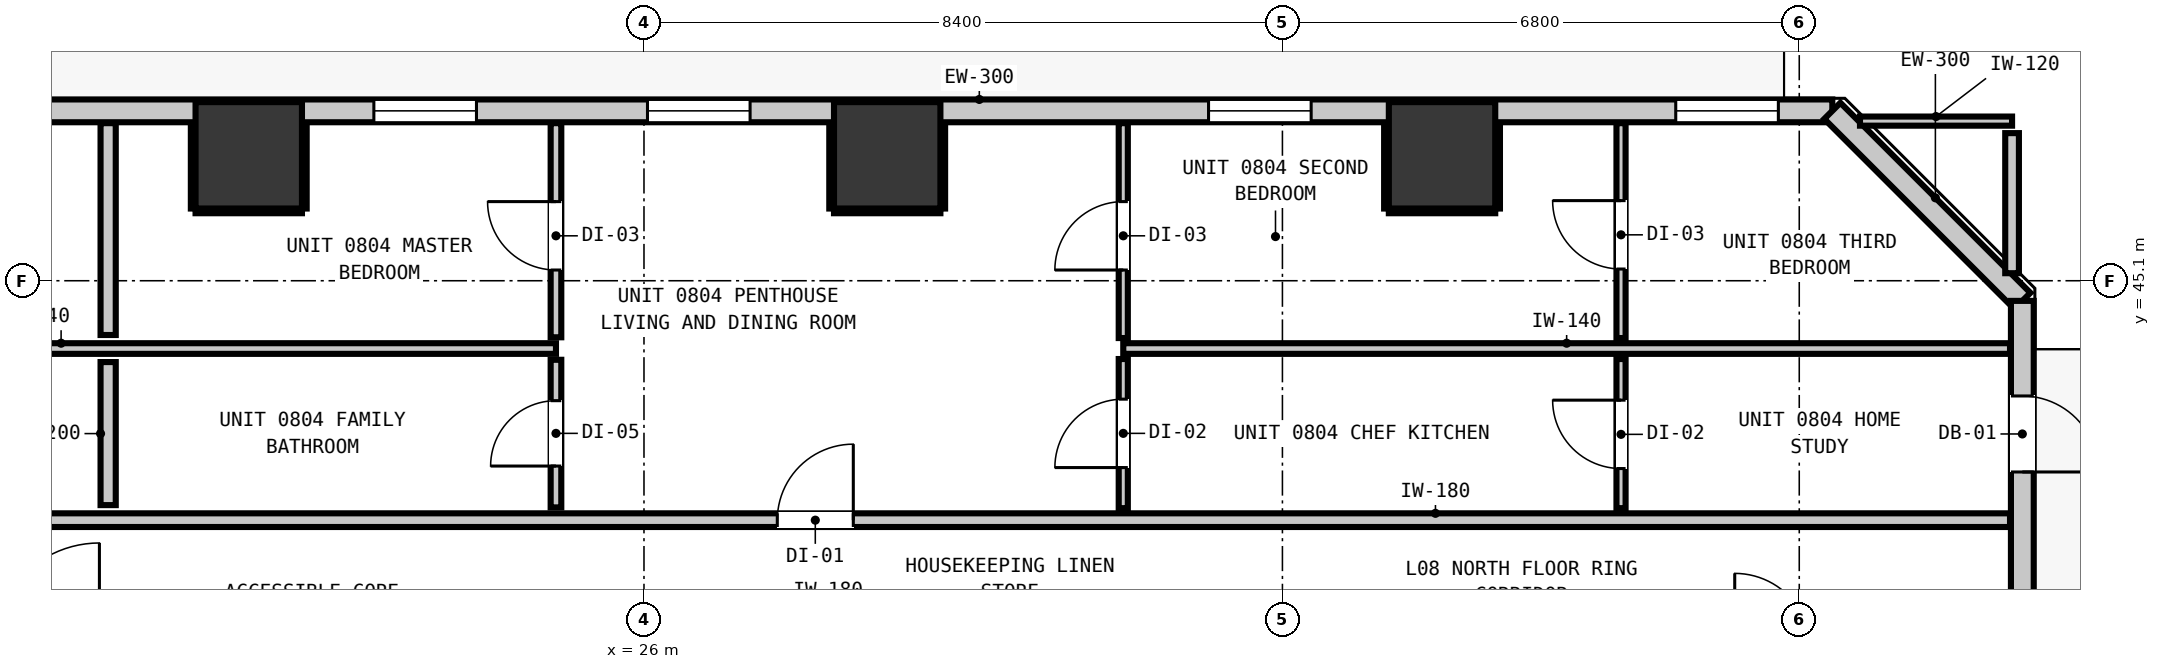
"""IFC4 building model, lengths in metres.
Left out: names, types, materials, properties, quantities, classifications, styles, units other than length and angle.
Written with IfcOpenShell. Run it as: python <this file> out.ifc"""

import sys

from ifc_helpers import new_model, si_unit, direction, frame, frame_2d, origin, origin_2d, place, context, subcontext, project, spatial, rectangle, extrude, element, fill, save


model = new_model("IFC4")
c1 = context("Model", 3, precision=1e-05, world=origin(), true_north=direction((0.0, 1.0)))
c2 = subcontext(c1, "Body", "Model", "MODEL_VIEW")
j1 = project(units=[si_unit("LENGTHUNIT", "METRE"), si_unit("PLANEANGLEUNIT", "RADIAN")], contexts=[c1])
p1 = place(None, origin())
s1 = spatial("IfcSite", under=j1, at=p1, CompositionType="ELEMENT")
p2 = place(p1, origin())
s2 = spatial("IfcBuilding", under=s1, at=p2, CompositionType="ELEMENT")
p3 = place(p2, frame((0.0, 0.0, 31.96)))
s3 = spatial("IfcBuildingStorey", under=s2, at=p3, CompositionType="ELEMENT", Elevation=31.96)
for number, where, z_axis, x_axis in (
    (1, (20.8, 46.75, 0.0), (0.0, 0.0, 1.0), (1.0, 0.0, 0.0)),
    (2, (29.2, 46.75, 0.0), (0.0, 0.0, 1.0), (1.0, 0.0, 0.0)),
    (3, (36.5, 46.75, 0.0), (0.0, 0.0, 1.0), (1.0, 0.0, 0.0)),
):
    element("IfcColumn", number, at=place(p3, frame(where, z_axis=z_axis, x_axis=x_axis)), inside=s3, PredefinedType="COLUMN", context=c2, shape_type="SweptSolid", body=[
        extrude(rectangle(XDim=1.4, YDim=1.4, at=origin_2d()), origin(), (0.0, 0.0, 1.0), 3.32),
    ])
p4 = place(p3, frame((4.165, 47.335, 0.0), z_axis=(0.0, 0.0, 1.0), x_axis=(1.0, 0.0, 0.0)))
e4 = element("IfcWall", 4, at=p4, inside=s3, PredefinedType="STANDARD", context=c2, shape_type="SweptSolid", body=[
    extrude(rectangle(XDim=37.47, YDim=0.3, at=frame_2d((18.735, 0.0))), origin(), (0.0, 0.0, 1.0), 3.06),
])
p5 = place(p4, frame((0.901, 0.0, 0.0)))
e5 = element("IfcOpeningElement", 5, at=p5, cuts=e4, PredefinedType="OPENING", context=c2, shape_type="SweptSolid", body=[
    extrude(rectangle(XDim=1.0, YDim=2.15, at=frame_2d((0.5, 1.075))), frame((0.0, 0.16, 0.0), z_axis=(0.0, -1.0, 0.0), x_axis=(1.0, 0.0, 0.0)), (0.0, 0.0, 1.0), 0.32),
])
p6 = place(p4, frame((4.568, 0.0, 0.85)))
e6 = element("IfcOpeningElement", 6, at=p6, cuts=e4, PredefinedType="OPENING", context=c2, shape_type="SweptSolid", body=[
    extrude(rectangle(XDim=1.35, YDim=1.85, at=frame_2d((0.675, 0.925))), frame((0.0, 0.16, 0.0), z_axis=(0.0, -1.0, 0.0), x_axis=(1.0, 0.0, 0.0)), (0.0, 0.0, 1.0), 0.32),
])
p7 = place(p4, frame((11.72, 0.0, 0.85)))
e7 = element("IfcOpeningElement", 7, at=p7, cuts=e4, PredefinedType="OPENING", context=c2, shape_type="SweptSolid", body=[
    extrude(rectangle(XDim=1.35, YDim=1.85, at=frame_2d((0.675, 0.925))), frame((0.0, 0.16, 0.0), z_axis=(0.0, -1.0, 0.0), x_axis=(1.0, 0.0, 0.0)), (0.0, 0.0, 1.0), 0.32),
])
p8 = place(p4, frame((21.881, 0.0, 0.85)))
e8 = element("IfcOpeningElement", 8, at=p8, cuts=e4, PredefinedType="OPENING", context=c2, shape_type="SweptSolid", body=[
    extrude(rectangle(XDim=1.35, YDim=1.85, at=frame_2d((0.675, 0.925))), frame((0.0, 0.16, 0.0), z_axis=(0.0, -1.0, 0.0), x_axis=(1.0, 0.0, 0.0)), (0.0, 0.0, 1.0), 0.32),
])
p9 = place(p4, frame((18.281, 0.0, 0.85)))
e9 = element("IfcOpeningElement", 9, at=p9, cuts=e4, PredefinedType="OPENING", context=c2, shape_type="SweptSolid", body=[
    extrude(rectangle(XDim=1.35, YDim=1.85, at=frame_2d((0.675, 0.925))), frame((0.0, 0.16, 0.0), z_axis=(0.0, -1.0, 0.0), x_axis=(1.0, 0.0, 0.0)), (0.0, 0.0, 1.0), 0.32),
])
p10 = place(p4, frame((29.263, 0.0, 0.85)))
e10 = element("IfcOpeningElement", 10, at=p10, cuts=e4, PredefinedType="OPENING", context=c2, shape_type="SweptSolid", body=[
    extrude(rectangle(XDim=1.35, YDim=1.85, at=frame_2d((0.675, 0.925))), frame((0.0, 0.16, 0.0), z_axis=(0.0, -1.0, 0.0), x_axis=(1.0, 0.0, 0.0)), (0.0, 0.0, 1.0), 0.32),
])
p11 = place(p4, frame((35.41, 0.0, 0.85)))
e11 = element("IfcOpeningElement", 11, at=p11, cuts=e4, PredefinedType="OPENING", context=c2, shape_type="SweptSolid", body=[
    extrude(rectangle(XDim=1.35, YDim=1.85, at=frame_2d((0.675, 0.925))), frame((0.0, 0.16, 0.0), z_axis=(0.0, -1.0, 0.0), x_axis=(1.0, 0.0, 0.0)), (0.0, 0.0, 1.0), 0.32),
])
p12 = place(p3, frame((41.635, 47.335, 0.0), z_axis=(0.0, 0.0, 1.0), x_axis=(0.707106781187, -0.707106781187, 0.0)))
e12 = element("IfcWall", 12, at=p12, inside=s3, PredefinedType="STANDARD", context=c2, shape_type="SweptSolid", body=[
    extrude(rectangle(XDim=3.536, YDim=0.3, at=frame_2d((1.768, 0.0))), origin(), (0.0, 0.0, 1.0), 3.06),
])
p13 = place(p3, frame((44.135, 44.835, 0.0), z_axis=(0.0, 0.0, 1.0), x_axis=(0.0, -1.0, 0.0)))
e13 = element("IfcWall", 13, at=p13, inside=s3, PredefinedType="STANDARD", context=c2, shape_type="SweptSolid", body=[
    extrude(rectangle(XDim=34.67, YDim=0.3, at=frame_2d((17.335, 0.0))), origin(), (0.0, 0.0, 1.0), 3.06),
])
p14 = place(p13, frame((1.251, 0.0, 0.0)))
e14 = element("IfcOpeningElement", 14, at=p14, cuts=e13, PredefinedType="OPENING", context=c2, shape_type="SweptSolid", body=[
    extrude(rectangle(XDim=1.0, YDim=2.15, at=frame_2d((0.5, 1.075))), frame((0.0, 0.16, 0.0), z_axis=(0.0, -1.0, 0.0), x_axis=(1.0, 0.0, 0.0)), (0.0, 0.0, 1.0), 0.32),
])
p15 = place(p13, frame((32.583, 0.0, 0.85)))
e15 = element("IfcOpeningElement", 15, at=p15, cuts=e13, PredefinedType="OPENING", context=c2, shape_type="SweptSolid", body=[
    extrude(rectangle(XDim=1.35, YDim=1.85, at=frame_2d((0.675, 0.925))), frame((0.0, 0.16, 0.0), z_axis=(0.0, -1.0, 0.0), x_axis=(1.0, 0.0, 0.0)), (0.0, 0.0, 1.0), 0.32),
])
p16 = place(p13, frame((17.81, 0.0, 0.85)))
e16 = element("IfcOpeningElement", 16, at=p16, cuts=e13, PredefinedType="OPENING", context=c2, shape_type="SweptSolid", body=[
    extrude(rectangle(XDim=1.35, YDim=1.85, at=frame_2d((0.675, 0.925))), frame((0.0, 0.16, 0.0), z_axis=(0.0, -1.0, 0.0), x_axis=(1.0, 0.0, 0.0)), (0.0, 0.0, 1.0), 0.32),
])
p17 = place(p13, frame((6.834, 0.0, 0.85)))
e17 = element("IfcOpeningElement", 17, at=p17, cuts=e13, PredefinedType="OPENING", context=c2, shape_type="SweptSolid", body=[
    extrude(rectangle(XDim=1.35, YDim=1.85, at=frame_2d((0.675, 0.925))), frame((0.0, 0.16, 0.0), z_axis=(0.0, -1.0, 0.0), x_axis=(1.0, 0.0, 0.0)), (0.0, 0.0, 1.0), 0.32),
])
p18 = place(p3, frame((12.989, 41.95, 0.0), z_axis=(0.0, 0.0, 1.0), x_axis=(1.0, 0.0, 0.0)))
e18 = element("IfcWall", 18, at=p18, inside=s3, PredefinedType="PARTITIONING", context=c2, shape_type="SweptSolid", body=[
    extrude(rectangle(XDim=30.984, YDim=0.18, at=frame_2d((15.492, 0.0))), origin(), (0.0, 0.0, 1.0), 3.06),
])
p19 = place(p18, frame((14.765, 0.0, 0.0)))
e19 = element("IfcOpeningElement", 19, at=p19, cuts=e18, PredefinedType="OPENING", context=c2, shape_type="SweptSolid", body=[
    extrude(rectangle(XDim=1.0, YDim=2.15, at=frame_2d((0.5, 1.075))), frame((0.0, 0.1, 0.0), z_axis=(0.0, -1.0, 0.0), x_axis=(1.0, 0.0, 0.0)), (0.0, 0.0, 1.0), 0.2),
])
p20 = place(p3, frame((11.82, 44.208, 0.0), z_axis=(0.0, 0.0, 1.0), x_axis=(1.0, 0.0, 0.0)))
e20 = element("IfcWall", 20, at=p20, inside=s3, PredefinedType="PARTITIONING", context=c2, shape_type="SweptSolid", body=[
    extrude(rectangle(XDim=13.022, YDim=0.14, at=frame_2d((6.511, 0.0))), origin(), (0.0, 0.0, 1.0), 3.06),
])
p21 = place(p3, frame((32.306, 44.208, 0.0), z_axis=(0.0, 0.0, 1.0), x_axis=(1.0, 0.0, 0.0)))
e21 = element("IfcWall", 21, at=p21, inside=s3, PredefinedType="PARTITIONING", context=c2, shape_type="SweptSolid", body=[
    extrude(rectangle(XDim=11.667, YDim=0.14, at=frame_2d((5.833, 0.0))), origin(), (0.0, 0.0, 1.0), 3.06),
])
p22 = place(p3, frame((41.999, 47.2, 0.0), z_axis=(0.0, 0.0, 1.0), x_axis=(1.0, 0.0, 0.0)))
e22 = element("IfcWall", 22, at=p22, inside=s3, PredefinedType="PARTITIONING", context=c2, shape_type="SweptSolid", body=[
    extrude(rectangle(XDim=2.001, YDim=0.12, at=frame_2d((1.0, 0.0))), origin(), (0.0, 0.0, 1.0), 3.06),
])
p23 = place(p3, frame((18.95, 42.148, 0.0), z_axis=(0.0, 0.0, 1.0), x_axis=(0.0, 1.0, 0.0)))
e23 = element("IfcWall", 23, at=p23, inside=s3, PredefinedType="PARTITIONING", context=c2, shape_type="SweptSolid", body=[
    extrude(rectangle(XDim=1.882, YDim=0.2, at=frame_2d((0.941, 0.0))), origin(), (0.0, 0.0, 1.0), 3.06),
])
p24 = place(p3, frame((18.95, 44.386, 0.0), z_axis=(0.0, 0.0, 1.0), x_axis=(0.0, 1.0, 0.0)))
e24 = element("IfcWall", 24, at=p24, inside=s3, PredefinedType="PARTITIONING", context=c2, shape_type="SweptSolid", body=[
    extrude(rectangle(XDim=2.787, YDim=0.2, at=frame_2d((1.394, 0.0))), origin(), (0.0, 0.0, 1.0), 3.06),
])
p25 = place(p3, frame((44.0, 45.199, 0.0), z_axis=(0.0, 0.0, 1.0), x_axis=(0.0, 1.0, 0.0)))
e25 = element("IfcWall", 25, at=p25, inside=s3, PredefinedType="PARTITIONING", context=c2, shape_type="SweptSolid", body=[
    extrude(rectangle(XDim=1.843, YDim=0.18, at=frame_2d((0.921, 0.0))), origin(), (0.0, 0.0, 1.0), 3.06),
])
p26 = place(p3, frame((24.842, 42.118, 0.0), z_axis=(0.0, 0.0, 1.0), x_axis=(0.0, 1.0, 0.0)))
e26 = element("IfcWall", 26, at=p26, inside=s3, PredefinedType="PARTITIONING", context=c2, shape_type="SweptSolid", body=[
    extrude(rectangle(XDim=1.942, YDim=0.14, at=frame_2d((0.971, 0.0))), origin(), (0.0, 0.0, 1.0), 3.06),
])
p27 = place(p26, frame((0.544, 0.0, 0.0)))
e27 = element("IfcOpeningElement", 27, at=p27, cuts=e26, PredefinedType="OPENING", context=c2, shape_type="SweptSolid", body=[
    extrude(rectangle(XDim=0.86, YDim=2.02, at=frame_2d((0.43, 1.01))), frame((0.0, 0.08, 0.0), z_axis=(0.0, -1.0, 0.0), x_axis=(1.0, 0.0, 0.0)), (0.0, 0.0, 1.0), 0.16),
])
p28 = place(p3, frame((24.842, 44.356, 0.0), z_axis=(0.0, 0.0, 1.0), x_axis=(0.0, 1.0, 0.0)))
e28 = element("IfcWall", 28, at=p28, inside=s3, PredefinedType="PARTITIONING", context=c2, shape_type="SweptSolid", body=[
    extrude(rectangle(XDim=2.817, YDim=0.14, at=frame_2d((1.409, 0.0))), origin(), (0.0, 0.0, 1.0), 3.06),
])
p29 = place(p28, frame((0.885, 0.0, 0.0)))
e29 = element("IfcOpeningElement", 29, at=p29, cuts=e28, PredefinedType="OPENING", context=c2, shape_type="SweptSolid", body=[
    extrude(rectangle(XDim=0.9, YDim=2.1, at=frame_2d((0.45, 1.05))), frame((0.0, 0.08, 0.0), z_axis=(0.0, -1.0, 0.0), x_axis=(1.0, 0.0, 0.0)), (0.0, 0.0, 1.0), 0.16),
])
p30 = place(p3, frame((32.306, 42.108, 0.0), z_axis=(0.0, 0.0, 1.0), x_axis=(0.0, 1.0, 0.0)))
e30 = element("IfcWall", 30, at=p30, inside=s3, PredefinedType="PARTITIONING", context=c2, shape_type="SweptSolid", body=[
    extrude(rectangle(XDim=1.962, YDim=0.12, at=frame_2d((0.981, 0.0))), origin(), (0.0, 0.0, 1.0), 3.06),
])
p31 = place(p30, frame((0.534, 0.0, 0.0)))
e31 = element("IfcOpeningElement", 31, at=p31, cuts=e30, PredefinedType="OPENING", context=c2, shape_type="SweptSolid", body=[
    extrude(rectangle(XDim=0.9, YDim=2.1, at=frame_2d((0.45, 1.05))), frame((0.0, 0.07, 0.0), z_axis=(0.0, -1.0, 0.0), x_axis=(1.0, 0.0, 0.0)), (0.0, 0.0, 1.0), 0.14),
])
p32 = place(p3, frame((32.306, 44.346, 0.0), z_axis=(0.0, 0.0, 1.0), x_axis=(0.0, 1.0, 0.0)))
e32 = element("IfcWall", 32, at=p32, inside=s3, PredefinedType="PARTITIONING", context=c2, shape_type="SweptSolid", body=[
    extrude(rectangle(XDim=2.827, YDim=0.12, at=frame_2d((1.414, 0.0))), origin(), (0.0, 0.0, 1.0), 3.06),
])
p33 = place(p32, frame((0.895, 0.0, 0.0)))
e33 = element("IfcOpeningElement", 33, at=p33, cuts=e32, PredefinedType="OPENING", context=c2, shape_type="SweptSolid", body=[
    extrude(rectangle(XDim=0.9, YDim=2.1, at=frame_2d((0.45, 1.05))), frame((0.0, 0.07, 0.0), z_axis=(0.0, -1.0, 0.0), x_axis=(1.0, 0.0, 0.0)), (0.0, 0.0, 1.0), 0.14),
])
p34 = place(p3, frame((38.855, 42.108, 0.0), z_axis=(0.0, 0.0, 1.0), x_axis=(0.0, 1.0, 0.0)))
e34 = element("IfcWall", 34, at=p34, inside=s3, PredefinedType="PARTITIONING", context=c2, shape_type="SweptSolid", body=[
    extrude(rectangle(XDim=1.962, YDim=0.12, at=frame_2d((0.981, 0.0))), origin(), (0.0, 0.0, 1.0), 3.06),
])
p35 = place(p34, frame((0.521, 0.0, 0.0)))
e35 = element("IfcOpeningElement", 35, at=p35, cuts=e34, PredefinedType="OPENING", context=c2, shape_type="SweptSolid", body=[
    extrude(rectangle(XDim=0.9, YDim=2.1, at=frame_2d((0.45, 1.05))), frame((0.0, 0.07, 0.0), z_axis=(0.0, -1.0, 0.0), x_axis=(1.0, 0.0, 0.0)), (0.0, 0.0, 1.0), 0.14),
])
p36 = place(p3, frame((38.855, 44.346, 0.0), z_axis=(0.0, 0.0, 1.0), x_axis=(0.0, 1.0, 0.0)))
e36 = element("IfcWall", 36, at=p36, inside=s3, PredefinedType="PARTITIONING", context=c2, shape_type="SweptSolid", body=[
    extrude(rectangle(XDim=2.827, YDim=0.12, at=frame_2d((1.414, 0.0))), origin(), (0.0, 0.0, 1.0), 3.06),
])
p37 = place(p36, frame((0.908, 0.0, 0.0)))
e37 = element("IfcOpeningElement", 37, at=p37, cuts=e36, PredefinedType="OPENING", context=c2, shape_type="SweptSolid", body=[
    extrude(rectangle(XDim=0.9, YDim=2.1, at=frame_2d((0.45, 1.05))), frame((0.0, 0.07, 0.0), z_axis=(0.0, -1.0, 0.0), x_axis=(1.0, 0.0, 0.0)), (0.0, 0.0, 1.0), 0.14),
])
p38 = place(p3, frame((20.1, 46.018, 0.0), z_axis=(0.0, 0.0, 1.0), x_axis=(1.0, 0.0, 0.0)))
e38 = element("IfcWall", 38, at=p38, inside=s3, PredefinedType="PARTITIONING", context=c2, shape_type="SweptSolid", body=[
    extrude(rectangle(XDim=1.4, YDim=0.06, at=frame_2d((0.7, 0.0))), origin(), (0.0, 0.0, 1.0), 1.45),
])
for number, where, z_axis, x_axis in (
    (39, (20.068, 46.05, 0.0), (0.0, 0.0, 1.0), (0.0, 1.0, 0.0)),
    (40, (21.532, 46.05, 0.0), (0.0, 0.0, 1.0), (0.0, 1.0, 0.0)),
):
    element("IfcWall", number, at=place(p3, frame(where, z_axis=z_axis, x_axis=x_axis)), inside=s3, PredefinedType="PARTITIONING", context=c2, shape_type="SweptSolid", body=[
        extrude(rectangle(XDim=1.12, YDim=0.06, at=frame_2d((0.56, 0.0))), origin(), (0.0, 0.0, 1.0), 1.45),
    ])
p39 = place(p3, frame((28.5, 46.018, 0.0), z_axis=(0.0, 0.0, 1.0), x_axis=(1.0, 0.0, 0.0)))
e41 = element("IfcWall", 41, at=p39, inside=s3, PredefinedType="PARTITIONING", context=c2, shape_type="SweptSolid", body=[
    extrude(rectangle(XDim=1.4, YDim=0.06, at=frame_2d((0.7, 0.0))), origin(), (0.0, 0.0, 1.0), 1.45),
])
for number, where, z_axis, x_axis in (
    (42, (28.468, 46.05, 0.0), (0.0, 0.0, 1.0), (0.0, 1.0, 0.0)),
    (43, (29.932, 46.05, 0.0), (0.0, 0.0, 1.0), (0.0, 1.0, 0.0)),
):
    element("IfcWall", number, at=place(p3, frame(where, z_axis=z_axis, x_axis=x_axis)), inside=s3, PredefinedType="PARTITIONING", context=c2, shape_type="SweptSolid", body=[
        extrude(rectangle(XDim=1.12, YDim=0.06, at=frame_2d((0.56, 0.0))), origin(), (0.0, 0.0, 1.0), 1.45),
    ])
p40 = place(p3, frame((35.8, 46.018, 0.0), z_axis=(0.0, 0.0, 1.0), x_axis=(1.0, 0.0, 0.0)))
e44 = element("IfcWall", 44, at=p40, inside=s3, PredefinedType="PARTITIONING", context=c2, shape_type="SweptSolid", body=[
    extrude(rectangle(XDim=1.4, YDim=0.06, at=frame_2d((0.7, 0.0))), origin(), (0.0, 0.0, 1.0), 1.45),
])
for number, where, z_axis, x_axis in (
    (45, (35.768, 46.05, 0.0), (0.0, 0.0, 1.0), (0.0, 1.0, 0.0)),
    (46, (37.232, 46.05, 0.0), (0.0, 0.0, 1.0), (0.0, 1.0, 0.0)),
):
    element("IfcWall", number, at=place(p3, frame(where, z_axis=z_axis, x_axis=x_axis)), inside=s3, PredefinedType="PARTITIONING", context=c2, shape_type="SweptSolid", body=[
        extrude(rectangle(XDim=1.12, YDim=0.06, at=frame_2d((0.56, 0.0))), origin(), (0.0, 0.0, 1.0), 1.45),
    ])
p41 = place(p14, origin())
e47 = element("IfcDoor", 47, at=p41, inside=s3, OperationType="SINGLE_SWING_RIGHT", PredefinedType="DOOR", context=c2, shape_type="SweptSolid", body=[
    extrude(rectangle(XDim=1.0, YDim=2.15, at=frame_2d((0.5, 1.075))), frame((0.0, 0.025, 0.0), z_axis=(0.0, -1.0, 0.0), x_axis=(1.0, 0.0, 0.0)), (0.0, 0.0, 1.0), 0.05),
])
fill(e14, e47)
p42 = place(p8, origin())
e48 = element("IfcWindow", 48, at=p42, inside=s3, PartitioningType="SINGLE_PANEL", PredefinedType="WINDOW", context=c2, shape_type="SweptSolid", body=[
    extrude(rectangle(XDim=1.35, YDim=1.85, at=frame_2d((0.675, 0.925))), frame((0.0, 0.03, 0.0), z_axis=(0.0, -1.0, 0.0), x_axis=(1.0, 0.0, 0.0)), (0.0, 0.0, 1.0), 0.06),
])
fill(e8, e48)
p43 = place(p9, origin())
e49 = element("IfcWindow", 49, at=p43, inside=s3, PartitioningType="SINGLE_PANEL", PredefinedType="WINDOW", context=c2, shape_type="SweptSolid", body=[
    extrude(rectangle(XDim=1.35, YDim=1.85, at=frame_2d((0.675, 0.925))), frame((0.0, 0.03, 0.0), z_axis=(0.0, -1.0, 0.0), x_axis=(1.0, 0.0, 0.0)), (0.0, 0.0, 1.0), 0.06),
])
fill(e9, e49)
p44 = place(p10, origin())
e50 = element("IfcWindow", 50, at=p44, inside=s3, PartitioningType="SINGLE_PANEL", PredefinedType="WINDOW", context=c2, shape_type="SweptSolid", body=[
    extrude(rectangle(XDim=1.35, YDim=1.85, at=frame_2d((0.675, 0.925))), frame((0.0, 0.03, 0.0), z_axis=(0.0, -1.0, 0.0), x_axis=(1.0, 0.0, 0.0)), (0.0, 0.0, 1.0), 0.06),
])
fill(e10, e50)
p45 = place(p11, origin())
e51 = element("IfcWindow", 51, at=p45, inside=s3, PartitioningType="SINGLE_PANEL", PredefinedType="WINDOW", context=c2, shape_type="SweptSolid", body=[
    extrude(rectangle(XDim=1.35, YDim=1.85, at=frame_2d((0.675, 0.925))), frame((0.0, 0.03, 0.0), z_axis=(0.0, -1.0, 0.0), x_axis=(1.0, 0.0, 0.0)), (0.0, 0.0, 1.0), 0.06),
])
fill(e11, e51)
p46 = place(p19, origin())
e52 = element("IfcDoor", 52, at=p46, inside=s3, OperationType="SINGLE_SWING_RIGHT", PredefinedType="DOOR", context=c2, shape_type="SweptSolid", body=[
    extrude(rectangle(XDim=1.0, YDim=2.15, at=frame_2d((0.5, 1.075))), frame((0.0, 0.025, 0.0), z_axis=(0.0, -1.0, 0.0), x_axis=(1.0, 0.0, 0.0)), (0.0, 0.0, 1.0), 0.05),
])
fill(e19, e52)
p47 = place(p27, origin())
e53 = element("IfcDoor", 53, at=p47, inside=s3, OperationType="SINGLE_SWING_LEFT", PredefinedType="DOOR", context=c2, shape_type="SweptSolid", body=[
    extrude(rectangle(XDim=0.86, YDim=2.02, at=frame_2d((0.43, 1.01))), frame((0.0, 0.025, 0.0), z_axis=(0.0, -1.0, 0.0), x_axis=(1.0, 0.0, 0.0)), (0.0, 0.0, 1.0), 0.05),
])
fill(e27, e53)
p48 = place(p29, origin())
e54 = element("IfcDoor", 54, at=p48, inside=s3, OperationType="SINGLE_SWING_RIGHT", PredefinedType="DOOR", context=c2, shape_type="SweptSolid", body=[
    extrude(rectangle(XDim=0.9, YDim=2.1, at=frame_2d((0.45, 1.05))), frame((0.0, 0.025, 0.0), z_axis=(0.0, -1.0, 0.0), x_axis=(1.0, 0.0, 0.0)), (0.0, 0.0, 1.0), 0.05),
])
fill(e29, e54)
p49 = place(p31, origin())
e55 = element("IfcDoor", 55, at=p49, inside=s3, OperationType="SINGLE_SWING_LEFT", PredefinedType="DOOR", context=c2, shape_type="SweptSolid", body=[
    extrude(rectangle(XDim=0.9, YDim=2.1, at=frame_2d((0.45, 1.05))), frame((0.0, 0.025, 0.0), z_axis=(0.0, -1.0, 0.0), x_axis=(1.0, 0.0, 0.0)), (0.0, 0.0, 1.0), 0.05),
])
fill(e31, e55)
p50 = place(p35, origin())
e56 = element("IfcDoor", 56, at=p50, inside=s3, OperationType="SINGLE_SWING_RIGHT", PredefinedType="DOOR", context=c2, shape_type="SweptSolid", body=[
    extrude(rectangle(XDim=0.9, YDim=2.1, at=frame_2d((0.45, 1.05))), frame((0.0, 0.025, 0.0), z_axis=(0.0, -1.0, 0.0), x_axis=(1.0, 0.0, 0.0)), (0.0, 0.0, 1.0), 0.05),
])
fill(e35, e56)
p51 = place(p33, origin())
e57 = element("IfcDoor", 57, at=p51, inside=s3, OperationType="SINGLE_SWING_LEFT", PredefinedType="DOOR", context=c2, shape_type="SweptSolid", body=[
    extrude(rectangle(XDim=0.9, YDim=2.1, at=frame_2d((0.45, 1.05))), frame((0.0, 0.025, 0.0), z_axis=(0.0, -1.0, 0.0), x_axis=(1.0, 0.0, 0.0)), (0.0, 0.0, 1.0), 0.05),
])
fill(e33, e57)
p52 = place(p37, origin())
e58 = element("IfcDoor", 58, at=p52, inside=s3, OperationType="SINGLE_SWING_RIGHT", PredefinedType="DOOR", context=c2, shape_type="SweptSolid", body=[
    extrude(rectangle(XDim=0.9, YDim=2.1, at=frame_2d((0.45, 1.05))), frame((0.0, 0.025, 0.0), z_axis=(0.0, -1.0, 0.0), x_axis=(1.0, 0.0, 0.0)), (0.0, 0.0, 1.0), 0.05),
])
fill(e37, e58)
save(model, sys.argv[1])
